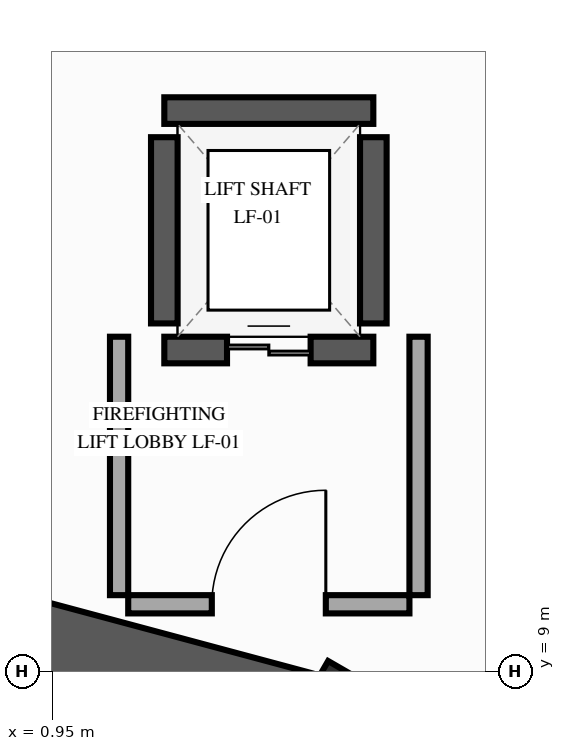
"""IFC4 building model, lengths in metres.
Left out: names, types, materials, properties, quantities, classifications, styles, units other than length and angle.
Written with IfcOpenShell. Run it as: python <this file> out.ifc"""

import sys

from ifc_helpers import new_model, si_unit, direction, frame, frame_2d, origin, origin_2d, place, context, subcontext, project, spatial, rectangle, extrude, element, fill, save


model = new_model("IFC4")
c1 = context("Model", 3, precision=1e-05, world=origin(), true_north=direction((0.0, 1.0)))
c2 = subcontext(c1, "Body", "Model", "MODEL_VIEW")
j1 = project(units=[si_unit("LENGTHUNIT", "METRE"), si_unit("PLANEANGLEUNIT", "RADIAN")], contexts=[c1])
p1 = place(None, origin())
s1 = spatial("IfcSite", under=j1, at=p1, CompositionType="ELEMENT")
p2 = place(p1, origin())
s2 = spatial("IfcBuilding", under=s1, at=p2, CompositionType="ELEMENT")
p3 = place(p2, origin())
s3 = spatial("IfcBuildingStorey", under=s2, at=p3, CompositionType="ELEMENT", Elevation=0.0)
p4 = place(p3, frame((4.8, 8.314, 0.0), z_axis=(0.0, 0.0, 1.0), x_axis=(0.5, 0.866025403784, 0.0)))
e1 = element("IfcColumn", 1, at=p4, inside=s3, PredefinedType="COLUMN", context=c2, shape_type="SweptSolid", body=[
    extrude(rectangle(XDim=1.2, YDim=1.2, at=origin_2d()), origin(), (0.0, 0.0, 1.0), 5.4),
])
p5 = place(p3, frame((4.22, 8.469, 0.0), z_axis=(0.0, 0.0, 1.0), x_axis=(-0.965874862682, 0.259009169026, 0.0)))
e2 = element("IfcWall", 2, at=p5, inside=s3, PredefinedType="SHEAR", context=c2, shape_type="SweptSolid", body=[
    extrude(rectangle(XDim=3.769, YDim=1.05, at=frame_2d((1.884, 0.0))), origin(), (0.0, 0.0, 1.0), 5.12),
])
p6 = place(p3, frame((2.425, 13.225, 0.0), z_axis=(0.0, 0.0, 1.0), x_axis=(1.0, 0.0, 0.0)))
e3 = element("IfcWall", 3, at=p6, inside=s3, PredefinedType="SHEAR", context=c2, shape_type="SweptSolid", body=[
    extrude(rectangle(XDim=2.75, YDim=0.35, at=frame_2d((1.375, 0.0))), origin(), (0.0, 0.0, 1.0), 5.12),
])
p7 = place(p6, frame((0.825, 0.0, 0.0)))
e4 = element("IfcOpeningElement", 4, at=p7, cuts=e3, PredefinedType="OPENING", context=c2, shape_type="SweptSolid", body=[
    extrude(rectangle(XDim=1.1, YDim=2.2, at=frame_2d((0.55, 1.1))), frame((0.0, 0.185, 0.0), z_axis=(0.0, -1.0, 0.0), x_axis=(1.0, 0.0, 0.0)), (0.0, 0.0, 1.0), 0.37),
])
p8 = place(p3, frame((5.175, 16.375, 0.0), z_axis=(0.0, 0.0, 1.0), x_axis=(-1.0, 0.0, 0.0)))
e5 = element("IfcWall", 5, at=p8, inside=s3, PredefinedType="SHEAR", context=c2, shape_type="SweptSolid", body=[
    extrude(rectangle(XDim=2.75, YDim=0.35, at=frame_2d((1.375, 0.0))), origin(), (0.0, 0.0, 1.0), 5.12),
])
for number, where, z_axis, x_axis in (
    (6, (2.425, 13.575, 0.0), (0.0, 0.0, 1.0), (0.0, 1.0, 0.0)),
    (7, (5.175, 13.575, 0.0), (0.0, 0.0, 1.0), (0.0, 1.0, 0.0)),
):
    element("IfcWall", number, at=place(p3, frame(where, z_axis=z_axis, x_axis=x_axis)), inside=s3, PredefinedType="SHEAR", context=c2, shape_type="SweptSolid", body=[
        extrude(rectangle(XDim=2.45, YDim=0.35, at=frame_2d((1.225, 0.0))), origin(), (0.0, 0.0, 1.0), 5.12),
    ])
p9 = place(p3, frame((1.95, 9.88, 0.0), z_axis=(0.0, 0.0, 1.0), x_axis=(1.0, 0.0, 0.0)))
e8 = element("IfcWall", 8, at=p9, inside=s3, PredefinedType="PARTITIONING", context=c2, shape_type="SweptSolid", body=[
    extrude(rectangle(XDim=3.7, YDim=0.24, at=frame_2d((1.85, 0.0))), origin(), (0.0, 0.0, 1.0), 4.405),
])
p10 = place(p9, frame((1.1, 0.0, 0.0)))
e9 = element("IfcOpeningElement", 9, at=p10, cuts=e8, PredefinedType="OPENING", context=c2, shape_type="SweptSolid", body=[
    extrude(rectangle(XDim=1.5, YDim=2.2, at=frame_2d((0.75, 1.1))), frame((0.0, 0.13, 0.0), z_axis=(0.0, -1.0, 0.0), x_axis=(1.0, 0.0, 0.0)), (0.0, 0.0, 1.0), 0.26),
])
p11 = place(p3, frame((1.83, 10.0, 0.0), z_axis=(0.0, 0.0, 1.0), x_axis=(0.0, 1.0, 0.0)))
e10 = element("IfcWall", 10, at=p11, inside=s3, PredefinedType="PARTITIONING", context=c2, shape_type="SweptSolid", body=[
    extrude(rectangle(XDim=3.4, YDim=0.24, at=frame_2d((1.7, 0.0))), origin(), (0.0, 0.0, 1.0), 5.07),
])
p12 = place(p3, frame((5.77, 10.0, 0.0), z_axis=(0.0, 0.0, 1.0), x_axis=(0.0, 1.0, 0.0)))
e11 = element("IfcWall", 11, at=p12, inside=s3, PredefinedType="PARTITIONING", context=c2, shape_type="SweptSolid", body=[
    extrude(rectangle(XDim=3.4, YDim=0.24, at=frame_2d((1.7, 0.0))), origin(), (0.0, 0.0, 1.0), 4.405),
])
p13 = place(p7, origin())
e12 = element("IfcDoor", 12, at=p13, inside=s3, OperationType="DOUBLE_DOOR_SLIDING", PredefinedType="DOOR", context=c2, shape_type="SweptSolid", body=[
    extrude(rectangle(XDim=1.1, YDim=2.2, at=frame_2d((0.55, 1.1))), frame((0.0, 0.025, 0.0), z_axis=(0.0, -1.0, 0.0), x_axis=(1.0, 0.0, 0.0)), (0.0, 0.0, 1.0), 0.05),
])
fill(e4, e12)
p14 = place(p10, origin())
e13 = element("IfcDoor", 13, at=p14, inside=s3, OperationType="SINGLE_SWING_RIGHT", PredefinedType="DOOR", context=c2, shape_type="SweptSolid", body=[
    extrude(rectangle(XDim=1.5, YDim=2.2, at=frame_2d((0.75, 1.1))), frame((0.0, 0.025, 0.0), z_axis=(0.0, -1.0, 0.0), x_axis=(1.0, 0.0, 0.0)), (0.0, 0.0, 1.0), 0.05),
])
fill(e9, e13)
save(model, sys.argv[1])
